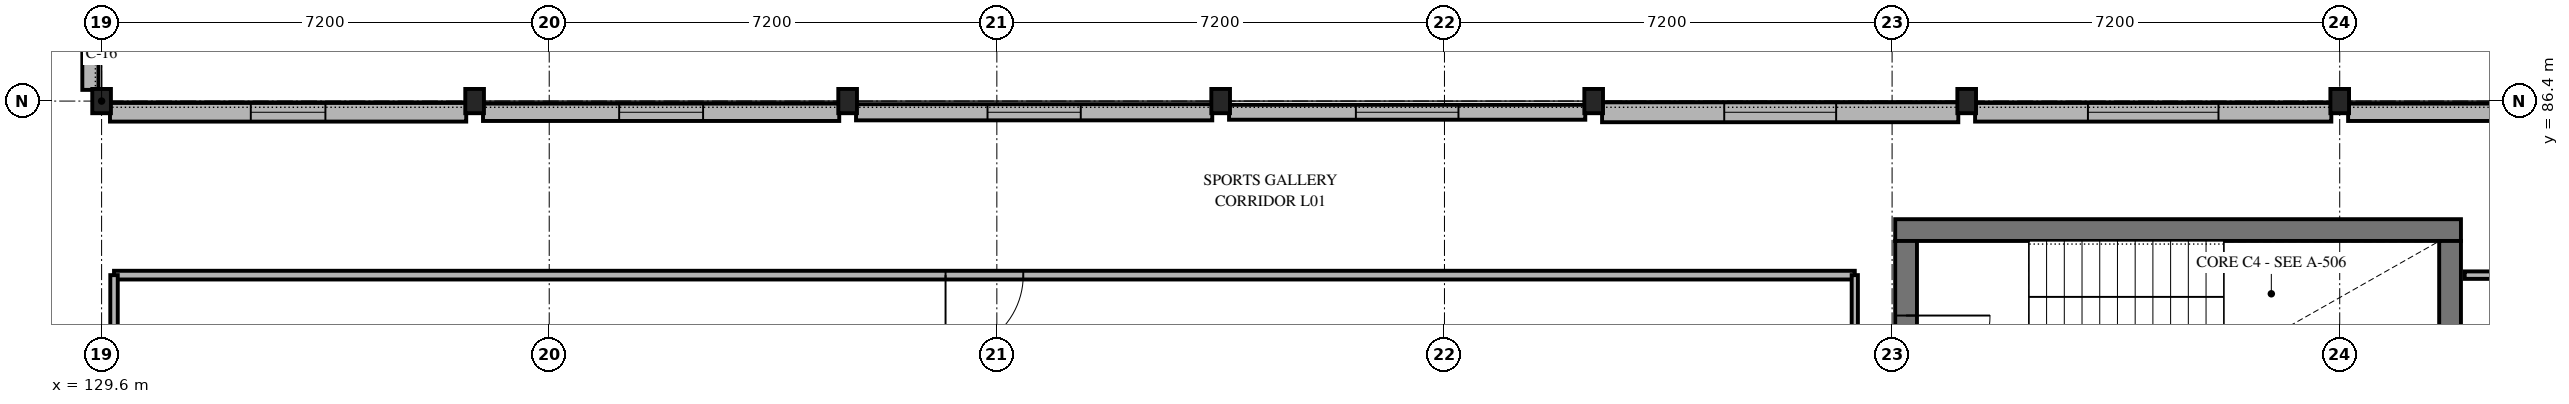
"""IFC4 building model, lengths in metres.
Left out: names, types, materials, properties, quantities, classifications, styles, units other than length and angle.
Written with IfcOpenShell. Run it as: python <this file> out.ifc"""

import sys

from ifc_helpers import new_model, si_unit, direction, frame, frame_2d, origin, origin_2d, place, context, subcontext, project, spatial, rectangle, i_section, extrude, element, fill, save


model = new_model("IFC4")
c1 = context("Model", 3, precision=1e-05, world=origin(), true_north=direction((0.0, 1.0)))
c2 = subcontext(c1, "Body", "Model", "MODEL_VIEW")
j1 = project(units=[si_unit("LENGTHUNIT", "METRE"), si_unit("PLANEANGLEUNIT", "RADIAN")], contexts=[c1])
p1 = place(None, origin())
s1 = spatial("IfcSite", under=j1, at=p1, CompositionType="ELEMENT")
p2 = place(p1, origin())
s2 = spatial("IfcBuilding", under=s1, at=p2, CompositionType="ELEMENT")
p3 = place(p2, frame((0.0, 0.0, 4.5)))
s3 = spatial("IfcBuildingStorey", under=s2, at=p3, CompositionType="ELEMENT", Elevation=4.5)
for number, where, z_axis, x_axis in (
    (1, (129.6, 86.4, 0.0), (0.0, 0.0, 1.0), (1.0, 0.0, 0.0)),
    (2, (135.6, 86.4, 0.0), (0.0, 0.0, 1.0), (1.0, 0.0, 0.0)),
    (3, (141.6, 86.4, 0.0), (0.0, 0.0, 1.0), (1.0, 0.0, 0.0)),
    (4, (147.6, 86.4, 0.0), (0.0, 0.0, 1.0), (1.0, 0.0, 0.0)),
    (5, (153.6, 86.4, 0.0), (0.0, 0.0, 1.0), (1.0, 0.0, 0.0)),
    (6, (159.6, 86.4, 0.0), (0.0, 0.0, 1.0), (1.0, 0.0, 0.0)),
    (7, (165.6, 86.4, 0.0), (0.0, 0.0, 1.0), (1.0, 0.0, 0.0)),
):
    element("IfcColumn", number, at=place(p3, frame(where, z_axis=z_axis, x_axis=x_axis)), inside=s3, PredefinedType="COLUMN", context=c2, shape_type="SweptSolid", body=[
        extrude(i_section(OverallWidth=0.3, OverallDepth=0.39, WebThickness=0.011, FlangeThickness=0.019, FilletRadius=0.027, at=origin_2d()), origin(), (0.0, 0.0, 1.0), 4.2),
    ])
p4 = place(p3, frame((129.735, 86.22, 0.0), z_axis=(0.0, 0.0, 1.0), x_axis=(1.0, 0.0, 0.0)))
e8 = element("IfcWall", 8, at=p4, inside=s3, PredefinedType="SOLIDWALL", context=c2, shape_type="SweptSolid", body=[
    extrude(rectangle(XDim=5.73, YDim=0.3, at=frame_2d((2.865, 0.0))), origin(), (0.0, 0.0, 1.0), 3.55),
])
p5 = place(p4, frame((2.265, 0.0, 0.9)))
e9 = element("IfcOpeningElement", 9, at=p5, cuts=e8, PredefinedType="OPENING", context=c2, shape_type="SweptSolid", body=[
    extrude(rectangle(XDim=1.2, YDim=1.2, at=frame_2d((0.6, 0.6))), frame((0.0, 0.16, 0.0), z_axis=(0.0, -1.0, 0.0), x_axis=(1.0, 0.0, 0.0)), (0.0, 0.0, 1.0), 0.32),
])
p6 = place(p3, frame((135.735, 86.22, 0.0), z_axis=(0.0, 0.0, 1.0), x_axis=(1.0, 0.0, 0.0)))
e10 = element("IfcWall", 10, at=p6, inside=s3, PredefinedType="SOLIDWALL", context=c2, shape_type="SweptSolid", body=[
    extrude(rectangle(XDim=5.73, YDim=0.28, at=frame_2d((2.865, 0.0))), origin(), (0.0, 0.0, 1.0), 3.55),
])
p7 = place(p6, frame((2.19, 0.0, 0.9)))
e11 = element("IfcOpeningElement", 11, at=p7, cuts=e10, PredefinedType="OPENING", context=c2, shape_type="SweptSolid", body=[
    extrude(rectangle(XDim=1.35, YDim=1.2, at=frame_2d((0.675, 0.6))), frame((0.0, 0.15, 0.0), z_axis=(0.0, -1.0, 0.0), x_axis=(1.0, 0.0, 0.0)), (0.0, 0.0, 1.0), 0.3),
])
p8 = place(p3, frame((141.735, 86.22, 0.0), z_axis=(0.0, 0.0, 1.0), x_axis=(1.0, 0.0, 0.0)))
e12 = element("IfcWall", 12, at=p8, inside=s3, PredefinedType="SOLIDWALL", context=c2, shape_type="SweptSolid", body=[
    extrude(rectangle(XDim=5.73, YDim=0.26, at=frame_2d((2.865, 0.0))), origin(), (0.0, 0.0, 1.0), 3.55),
])
p9 = place(p8, frame((2.115, 0.0, 0.9)))
e13 = element("IfcOpeningElement", 13, at=p9, cuts=e12, PredefinedType="OPENING", context=c2, shape_type="SweptSolid", body=[
    extrude(rectangle(XDim=1.5, YDim=1.2, at=frame_2d((0.75, 0.6))), frame((0.0, 0.14, 0.0), z_axis=(0.0, -1.0, 0.0), x_axis=(1.0, 0.0, 0.0)), (0.0, 0.0, 1.0), 0.28),
])
p10 = place(p3, frame((147.735, 86.22, 0.0), z_axis=(0.0, 0.0, 1.0), x_axis=(1.0, 0.0, 0.0)))
e14 = element("IfcWall", 14, at=p10, inside=s3, PredefinedType="SOLIDWALL", context=c2, shape_type="SweptSolid", body=[
    extrude(rectangle(XDim=5.73, YDim=0.24, at=frame_2d((2.865, 0.0))), origin(), (0.0, 0.0, 1.0), 3.55),
])
p11 = place(p10, frame((2.04, 0.0, 0.9)))
e15 = element("IfcOpeningElement", 15, at=p11, cuts=e14, PredefinedType="OPENING", context=c2, shape_type="SweptSolid", body=[
    extrude(rectangle(XDim=1.65, YDim=1.2, at=frame_2d((0.825, 0.6))), frame((0.0, 0.13, 0.0), z_axis=(0.0, -1.0, 0.0), x_axis=(1.0, 0.0, 0.0)), (0.0, 0.0, 1.0), 0.26),
])
p12 = place(p3, frame((153.735, 86.22, 0.0), z_axis=(0.0, 0.0, 1.0), x_axis=(1.0, 0.0, 0.0)))
e16 = element("IfcWall", 16, at=p12, inside=s3, PredefinedType="SOLIDWALL", context=c2, shape_type="SweptSolid", body=[
    extrude(rectangle(XDim=5.73, YDim=0.32, at=frame_2d((2.865, 0.0))), origin(), (0.0, 0.0, 1.0), 3.55),
])
p13 = place(p12, frame((1.965, 0.0, 0.9)))
e17 = element("IfcOpeningElement", 17, at=p13, cuts=e16, PredefinedType="OPENING", context=c2, shape_type="SweptSolid", body=[
    extrude(rectangle(XDim=1.8, YDim=1.2, at=frame_2d((0.9, 0.6))), frame((0.0, 0.17, 0.0), z_axis=(0.0, -1.0, 0.0), x_axis=(1.0, 0.0, 0.0)), (0.0, 0.0, 1.0), 0.34),
])
p14 = place(p3, frame((159.735, 86.22, 0.0), z_axis=(0.0, 0.0, 1.0), x_axis=(1.0, 0.0, 0.0)))
e18 = element("IfcWall", 18, at=p14, inside=s3, PredefinedType="SOLIDWALL", context=c2, shape_type="SweptSolid", body=[
    extrude(rectangle(XDim=5.73, YDim=0.3, at=frame_2d((2.865, 0.0))), origin(), (0.0, 0.0, 1.0), 3.59),
])
p15 = place(p14, frame((1.815, 0.0, 0.9)))
e19 = element("IfcOpeningElement", 19, at=p15, cuts=e18, PredefinedType="OPENING", context=c2, shape_type="SweptSolid", body=[
    extrude(rectangle(XDim=2.1, YDim=1.2, at=frame_2d((1.05, 0.6))), frame((0.0, 0.16, 0.0), z_axis=(0.0, -1.0, 0.0), x_axis=(1.0, 0.0, 0.0)), (0.0, 0.0, 1.0), 0.32),
])
p16 = place(p3, frame((165.735, 86.22, 0.0), z_axis=(0.0, 0.0, 1.0), x_axis=(1.0, 0.0, 0.0)))
e20 = element("IfcWall", 20, at=p16, inside=s3, PredefinedType="SOLIDWALL", context=c2, shape_type="SweptSolid", body=[
    extrude(rectangle(XDim=7.215, YDim=0.28, at=frame_2d((3.607, 0.0))), origin(), (0.0, 0.0, 1.0), 3.95),
])
p17 = place(p16, frame((3.008, 0.0, 0.9)))
e21 = element("IfcOpeningElement", 21, at=p17, cuts=e20, PredefinedType="OPENING", context=c2, shape_type="SweptSolid", body=[
    extrude(rectangle(XDim=1.2, YDim=1.35, at=frame_2d((0.6, 0.675))), frame((0.0, 0.15, 0.0), z_axis=(0.0, -1.0, 0.0), x_axis=(1.0, 0.0, 0.0)), (0.0, 0.0, 1.0), 0.3),
])
p18 = place(p3, frame((129.42, 108.15, 0.0), z_axis=(0.0, 0.0, 1.0), x_axis=(0.0, -1.0, 0.0)))
e22 = element("IfcWall", 22, at=p18, inside=s3, PredefinedType="SOLIDWALL", context=c2, shape_type="SweptSolid", body=[
    extrude(rectangle(XDim=21.57, YDim=0.26, at=frame_2d((10.785, 0.0))), origin(), (0.0, 0.0, 1.0), 3.95),
])
p19 = place(p18, frame((10.035, 0.0, 0.9)))
e23 = element("IfcOpeningElement", 23, at=p19, cuts=e22, PredefinedType="OPENING", context=c2, shape_type="SweptSolid", body=[
    extrude(rectangle(XDim=1.5, YDim=1.35, at=frame_2d((0.75, 0.675))), frame((0.0, 0.14, 0.0), z_axis=(0.0, -1.0, 0.0), x_axis=(1.0, 0.0, 0.0)), (0.0, 0.0, 1.0), 0.28),
])
p20 = place(p3, frame((167.55, 84.325, 0.0), z_axis=(0.0, 0.0, 1.0), x_axis=(-1.0, 0.0, 0.0)))
e24 = element("IfcWall", 24, at=p20, inside=s3, PredefinedType="SHEAR", context=c2, shape_type="SweptSolid", body=[
    extrude(rectangle(XDim=9.1, YDim=0.35, at=frame_2d((4.55, 0.0))), origin(), (0.0, 0.0, 1.0), 3.95),
])
p21 = place(p3, frame((167.375, 80.4, 0.0), z_axis=(0.0, 0.0, 1.0), x_axis=(0.0, 1.0, 0.0)))
e25 = element("IfcWall", 25, at=p21, inside=s3, PredefinedType="SHEAR", context=c2, shape_type="SweptSolid", body=[
    extrude(rectangle(XDim=3.75, YDim=0.35, at=frame_2d((1.875, 0.0))), origin(), (0.0, 0.0, 1.0), 3.95),
])
p22 = place(p3, frame((158.625, 84.15, 0.0), z_axis=(0.0, 0.0, 1.0), x_axis=(0.0, -1.0, 0.0)))
e26 = element("IfcWall", 26, at=p22, inside=s3, PredefinedType="SHEAR", context=c2, shape_type="SweptSolid", body=[
    extrude(rectangle(XDim=3.75, YDim=0.35, at=frame_2d((1.875, 0.0))), origin(), (0.0, 0.0, 1.0), 3.95),
])
p23 = place(p22, frame((1.2, 0.0, 0.0)))
e27 = element("IfcOpeningElement", 27, at=p23, cuts=e26, PredefinedType="OPENING", context=c2, shape_type="SweptSolid", body=[
    extrude(rectangle(XDim=1.35, YDim=2.2, at=frame_2d((0.675, 1.1))), frame((0.0, 0.185, 0.0), z_axis=(0.0, -1.0, 0.0), x_axis=(1.0, 0.0, 0.0)), (0.0, 0.0, 1.0), 0.37),
])
p24 = place(p3, frame((157.8, 83.6, 0.0), z_axis=(0.0, 0.0, 1.0), x_axis=(-1.0, 0.0, 0.0)))
e28 = element("IfcWall", 28, at=p24, inside=s3, PredefinedType="PARTITIONING", context=c2, shape_type="SweptSolid", body=[
    extrude(rectangle(XDim=28.0, YDim=0.14, at=frame_2d((14.0, 0.0))), origin(), (0.0, 0.0, 1.0), 3.55),
])
p25 = place(p24, frame((13.375, 0.0, 0.0)))
e29 = element("IfcOpeningElement", 29, at=p25, cuts=e28, PredefinedType="OPENING", context=c2, shape_type="SweptSolid", body=[
    extrude(rectangle(XDim=1.25, YDim=2.2, at=frame_2d((0.625, 1.1))), frame((0.0, 0.08, 0.0), z_axis=(0.0, -1.0, 0.0), x_axis=(1.0, 0.0, 0.0)), (0.0, 0.0, 1.0), 0.16),
])
p26 = place(p3, frame((129.8, 83.6, 0.0), z_axis=(0.0, 0.0, 1.0), x_axis=(0.0, -1.0, 0.0)))
e30 = element("IfcWall", 30, at=p26, inside=s3, PredefinedType="PARTITIONING", context=c2, shape_type="SweptSolid", body=[
    extrude(rectangle(XDim=4.0, YDim=0.12, at=frame_2d((2.0, 0.0))), origin(), (0.0, 0.0, 1.0), 3.65),
])
p27 = place(p26, frame((1.45, 0.0, 0.0)))
e31 = element("IfcOpeningElement", 31, at=p27, cuts=e30, PredefinedType="OPENING", context=c2, shape_type="SweptSolid", body=[
    extrude(rectangle(XDim=1.1, YDim=2.15, at=frame_2d((0.55, 1.075))), frame((0.0, 0.07, 0.0), z_axis=(0.0, -1.0, 0.0), x_axis=(1.0, 0.0, 0.0)), (0.0, 0.0, 1.0), 0.14),
])
p28 = place(p3, frame((157.8, 80.75, 0.0), z_axis=(0.0, 0.0, 1.0), x_axis=(0.0, 1.0, 0.0)))
e32 = element("IfcWall", 32, at=p28, inside=s3, PredefinedType="PARTITIONING", context=c2, shape_type="SweptSolid", body=[
    extrude(rectangle(XDim=2.85, YDim=0.1, at=frame_2d((1.425, 0.0))), origin(), (0.0, 0.0, 1.0), 3.95),
])
p29 = place(p3, frame((172.17, 83.6, 0.0), z_axis=(0.0, 0.0, 1.0), x_axis=(-1.0, 0.0, 0.0)))
e33 = element("IfcWall", 33, at=p29, inside=s3, PredefinedType="PARTITIONING", context=c2, shape_type="SweptSolid", body=[
    extrude(rectangle(XDim=4.56, YDim=0.12, at=frame_2d((2.28, 0.0))), origin(), (0.0, 0.0, 1.0), 3.95),
])
p30 = place(p29, frame((1.84, 0.0, 0.0)))
e34 = element("IfcOpeningElement", 34, at=p30, cuts=e33, PredefinedType="OPENING", context=c2, shape_type="SweptSolid", body=[
    extrude(rectangle(XDim=0.88, YDim=2.1, at=frame_2d((0.44, 1.05))), frame((0.0, 0.07, 0.0), z_axis=(0.0, -1.0, 0.0), x_axis=(1.0, 0.0, 0.0)), (0.0, 0.0, 1.0), 0.14),
])
p31 = place(p5, origin())
e35 = element("IfcWindow", 35, at=p31, inside=s3, PartitioningType="SINGLE_PANEL", PredefinedType="WINDOW", context=c2, shape_type="SweptSolid", body=[
    extrude(rectangle(XDim=1.2, YDim=1.2, at=frame_2d((0.6, 0.6))), frame((0.0, 0.03, 0.0), z_axis=(0.0, -1.0, 0.0), x_axis=(1.0, 0.0, 0.0)), (0.0, 0.0, 1.0), 0.06),
])
fill(e9, e35)
p32 = place(p7, origin())
e36 = element("IfcWindow", 36, at=p32, inside=s3, PartitioningType="SINGLE_PANEL", PredefinedType="WINDOW", context=c2, shape_type="SweptSolid", body=[
    extrude(rectangle(XDim=1.35, YDim=1.2, at=frame_2d((0.675, 0.6))), frame((0.0, 0.03, 0.0), z_axis=(0.0, -1.0, 0.0), x_axis=(1.0, 0.0, 0.0)), (0.0, 0.0, 1.0), 0.06),
])
fill(e11, e36)
p33 = place(p9, origin())
e37 = element("IfcWindow", 37, at=p33, inside=s3, PartitioningType="SINGLE_PANEL", PredefinedType="WINDOW", context=c2, shape_type="SweptSolid", body=[
    extrude(rectangle(XDim=1.5, YDim=1.2, at=frame_2d((0.75, 0.6))), frame((0.0, 0.03, 0.0), z_axis=(0.0, -1.0, 0.0), x_axis=(1.0, 0.0, 0.0)), (0.0, 0.0, 1.0), 0.06),
])
fill(e13, e37)
p34 = place(p11, origin())
e38 = element("IfcWindow", 38, at=p34, inside=s3, PartitioningType="SINGLE_PANEL", PredefinedType="WINDOW", context=c2, shape_type="SweptSolid", body=[
    extrude(rectangle(XDim=1.65, YDim=1.2, at=frame_2d((0.825, 0.6))), frame((0.0, 0.03, 0.0), z_axis=(0.0, -1.0, 0.0), x_axis=(1.0, 0.0, 0.0)), (0.0, 0.0, 1.0), 0.06),
])
fill(e15, e38)
p35 = place(p13, origin())
e39 = element("IfcWindow", 39, at=p35, inside=s3, PartitioningType="SINGLE_PANEL", PredefinedType="WINDOW", context=c2, shape_type="SweptSolid", body=[
    extrude(rectangle(XDim=1.8, YDim=1.2, at=frame_2d((0.9, 0.6))), frame((0.0, 0.03, 0.0), z_axis=(0.0, -1.0, 0.0), x_axis=(1.0, 0.0, 0.0)), (0.0, 0.0, 1.0), 0.06),
])
fill(e17, e39)
p36 = place(p15, origin())
e40 = element("IfcWindow", 40, at=p36, inside=s3, PartitioningType="SINGLE_PANEL", PredefinedType="WINDOW", context=c2, shape_type="SweptSolid", body=[
    extrude(rectangle(XDim=2.1, YDim=1.2, at=frame_2d((1.05, 0.6))), frame((0.0, 0.03, 0.0), z_axis=(0.0, -1.0, 0.0), x_axis=(1.0, 0.0, 0.0)), (0.0, 0.0, 1.0), 0.06),
])
fill(e19, e40)
p37 = place(p23, origin())
e41 = element("IfcDoor", 41, at=p37, inside=s3, OperationType="SINGLE_SWING_LEFT", PredefinedType="DOOR", context=c2, shape_type="SweptSolid", body=[
    extrude(rectangle(XDim=1.35, YDim=2.2, at=frame_2d((0.675, 1.1))), frame((0.0, 0.025, 0.0), z_axis=(0.0, -1.0, 0.0), x_axis=(1.0, 0.0, 0.0)), (0.0, 0.0, 1.0), 0.05),
])
fill(e27, e41)
p38 = place(p25, origin())
e42 = element("IfcDoor", 42, at=p38, inside=s3, OperationType="SINGLE_SWING_RIGHT", PredefinedType="DOOR", context=c2, shape_type="SweptSolid", body=[
    extrude(rectangle(XDim=1.25, YDim=2.2, at=frame_2d((0.625, 1.1))), frame((0.0, 0.025, 0.0), z_axis=(0.0, -1.0, 0.0), x_axis=(1.0, 0.0, 0.0)), (0.0, 0.0, 1.0), 0.05),
])
fill(e29, e42)
save(model, sys.argv[1])
